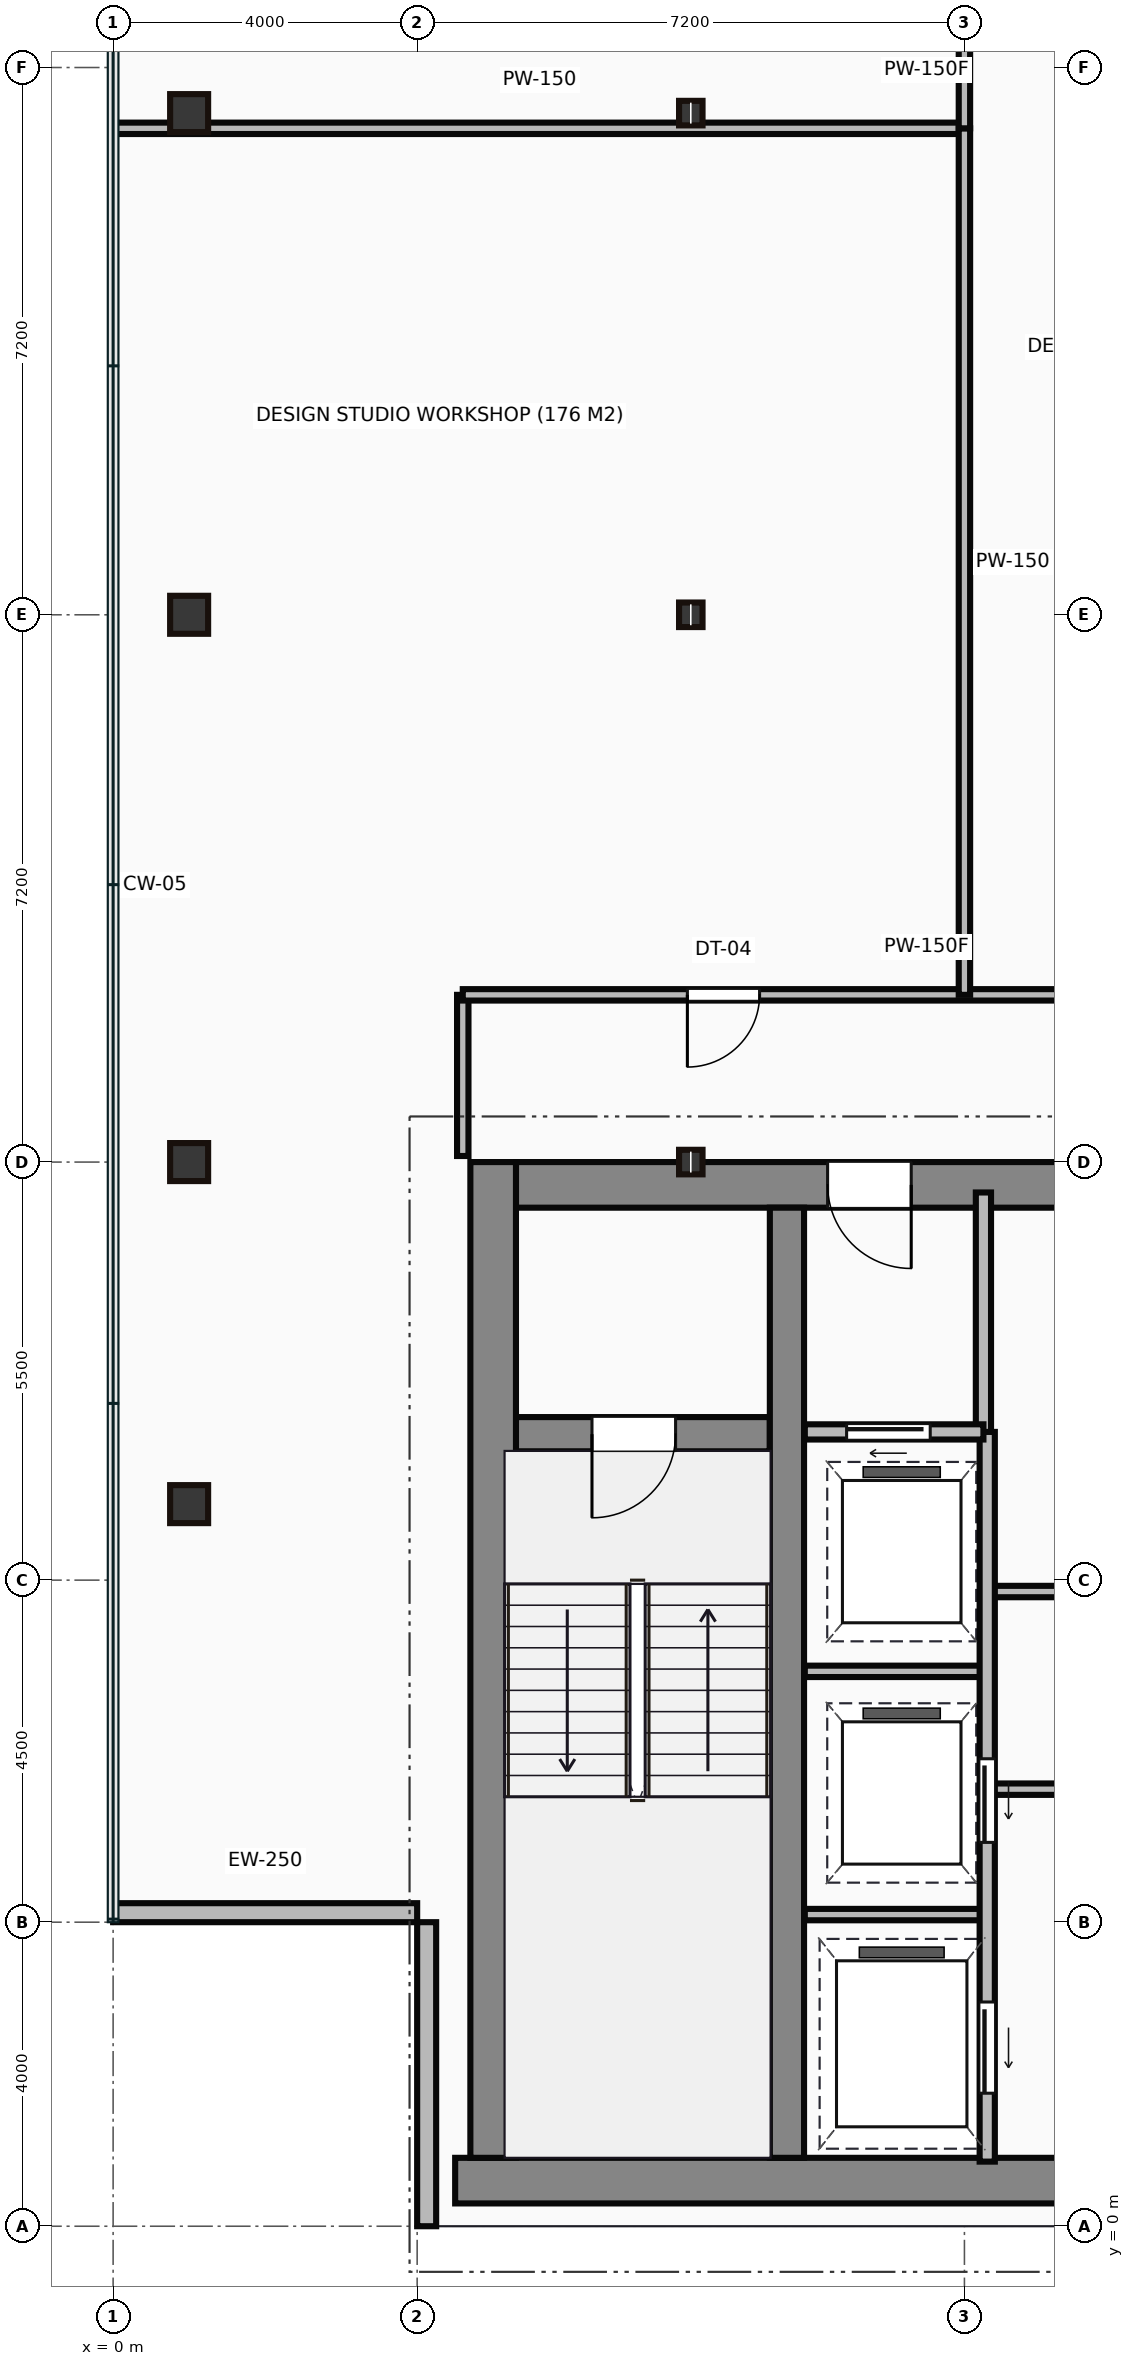
"""IFC4 building model, lengths in metres.
Left out: names, types, materials, properties, quantities, classifications, styles, units other than length and angle.
Written with IfcOpenShell. Run it as: python <this file> out.ifc"""

import sys

from ifc_helpers import new_model, si_unit, direction, frame, frame_2d, origin, origin_2d, place, context, subcontext, project, spatial, rectangle, hollow_rectangle, i_section, extrude, source, transform, mapped, element, fill, save


model = new_model("IFC4")
c1 = context("Model", 3, precision=1e-05, world=origin(), true_north=direction((0.0, 1.0)))
c2 = subcontext(c1, "Body", "Model", "MODEL_VIEW")
j1 = project(units=[si_unit("LENGTHUNIT", "METRE"), si_unit("PLANEANGLEUNIT", "RADIAN")], contexts=[c1])
p1 = place(None, origin())
s1 = spatial("IfcSite", under=j1, at=p1, CompositionType="ELEMENT")
p2 = place(p1, origin())
s2 = spatial("IfcBuilding", under=s1, at=p2, CompositionType="ELEMENT")
p3 = place(p2, frame((0.0, 0.0, 214.15)))
s3 = spatial("IfcBuildingStorey", under=s2, at=p3, CompositionType="ELEMENT", Elevation=214.15)
m1 = source(origin(), c2, "Body", "SweptSolid", [
    extrude(rectangle(XDim=29.5, YDim=0.6, at=frame_2d((14.75, 0.0))), origin(), (0.0, 0.0, 1.0), 3.65),
])
p4 = place(p3, frame((4.5, 0.6, 0.0), z_axis=(0.0, 0.0, 1.0), x_axis=(1.0, 0.0, 0.0)))
e1 = element("IfcWall", 1, at=p4, inside=s3, PredefinedType="SHEAR", context=c2, shape_type="MappedRepresentation", body=[
    mapped(m1, transform((0.0, 0.0, 0.0))),
])
m2 = source(origin(), c2, "Body", "SweptSolid", [
    extrude(rectangle(XDim=13.1, YDim=0.6, at=frame_2d((6.55, 0.0))), origin(), (0.0, 0.0, 1.0), 3.65),
])
p5 = place(p3, frame((5.0, 0.9, 0.0), z_axis=(0.0, 0.0, 1.0), x_axis=(0.0, 1.0, 0.0)))
e2 = element("IfcWall", 2, at=p5, inside=s3, PredefinedType="SHEAR", context=c2, shape_type="MappedRepresentation", body=[
    mapped(m2, transform((0.0, 0.0, 0.0))),
])
m3 = source(origin(), c2, "Body", "SweptSolid", [
    extrude(rectangle(XDim=9.1, YDim=0.6, at=frame_2d((4.55, 0.0))), origin(), (0.0, 0.0, 1.0), 3.65),
])
p6 = place(p3, frame((5.3, 13.7, 0.0), z_axis=(0.0, 0.0, 1.0), x_axis=(1.0, 0.0, 0.0)))
e3 = element("IfcWall", 3, at=p6, inside=s3, PredefinedType="SHEAR", context=c2, shape_type="MappedRepresentation", body=[
    mapped(m3, transform((0.0, 0.0, 0.0))),
])
p7 = place(p6, frame((4.1, 0.0, 0.0)))
e4 = element("IfcOpeningElement", 4, at=p7, cuts=e3, PredefinedType="OPENING", context=c2, shape_type="SweptSolid", body=[
    extrude(rectangle(XDim=1.1, YDim=2.15, at=frame_2d((0.55, 1.075))), frame((0.0, 0.31, 0.0), z_axis=(0.0, -1.0, 0.0), x_axis=(1.0, 0.0, 0.0)), (0.0, 0.0, 1.0), 0.62),
])
m4 = source(origin(), c2, "Body", "SweptSolid", [
    extrude(rectangle(XDim=12.5, YDim=0.45, at=frame_2d((6.25, 0.0))), origin(), (0.0, 0.0, 1.0), 3.65),
])
p8 = place(p3, frame((8.865, 0.9, 0.0), z_axis=(0.0, 0.0, 1.0), x_axis=(0.0, 1.0, 0.0)))
e5 = element("IfcWall", 5, at=p8, inside=s3, PredefinedType="SHEAR", context=c2, shape_type="MappedRepresentation", body=[
    mapped(m4, transform((0.0, 0.0, 0.0))),
])
m5 = source(origin(), c2, "Body", "SweptSolid", [
    extrude(rectangle(XDim=3.39, YDim=0.45, at=frame_2d((1.695, 0.0))), origin(), (0.0, 0.0, 1.0), 3.65),
])
p9 = place(p3, frame((5.25, 10.42, 0.0), z_axis=(0.0, 0.0, 1.0), x_axis=(1.0, 0.0, 0.0)))
e6 = element("IfcWall", 6, at=p9, inside=s3, PredefinedType="SHEAR", context=c2, shape_type="MappedRepresentation", body=[
    mapped(m5, transform((0.0, 0.0, 0.0))),
])
p10 = place(p9, frame((1.05, 0.0, 0.0)))
e7 = element("IfcOpeningElement", 7, at=p10, cuts=e6, PredefinedType="OPENING", context=c2, shape_type="SweptSolid", body=[
    extrude(rectangle(XDim=1.1, YDim=2.15, at=frame_2d((0.55, 1.075))), frame((0.0, 0.235, 0.0), z_axis=(0.0, -1.0, 0.0), x_axis=(1.0, 0.0, 0.0)), (0.0, 0.0, 1.0), 0.47),
])
m6 = source(origin(), c2, "Body", "SweptSolid", [
    extrude(hollow_rectangle(XDim=0.5, YDim=0.5, WallThickness=0.022, at=origin_2d()), origin(), (0.0, 0.0, 1.0), 3.65),
])
for number, where, z_axis, x_axis in (
    (8, (1.0, 9.5, 0.0), (0.0, 0.0, 1.0), (1.0, 0.0, 0.0)),
    (9, (1.0, 14.0, 0.0), (0.0, 0.0, 1.0), (1.0, 0.0, 0.0)),
    (10, (1.0, 21.2, 0.0), (0.0, 0.0, 1.0), (1.0, 0.0, 0.0)),
    (11, (1.0, 27.8, 0.0), (0.0, 0.0, 1.0), (1.0, 0.0, 0.0)),
):
    element("IfcColumn", number, at=place(p3, frame(where, z_axis=z_axis, x_axis=x_axis)), inside=s3, PredefinedType="COLUMN", context=c2, shape_type="MappedRepresentation", body=[
        mapped(m6, transform((0.0, 0.0, 0.0))),
    ])
m7 = source(origin(), c2, "Body", "SweptSolid", [
    extrude(i_section(OverallWidth=0.309, OverallDepth=0.323, WebThickness=0.014, FlangeThickness=0.023, at=origin_2d()), origin(), (0.0, 0.0, 1.0), 3.65),
])
for number, where, z_axis, x_axis in (
    (12, (7.6, 14.0, 0.0), (0.0, 0.0, 1.0), (1.0, 0.0, 0.0)),
    (13, (7.6, 21.2, 0.0), (0.0, 0.0, 1.0), (1.0, 0.0, 0.0)),
    (14, (7.6, 27.8, 0.0), (0.0, 0.0, 1.0), (1.0, 0.0, 0.0)),
):
    element("IfcColumn", number, at=place(p3, frame(where, z_axis=z_axis, x_axis=x_axis)), inside=s3, PredefinedType="COLUMN", context=c2, shape_type="MappedRepresentation", body=[
        mapped(m7, transform((0.0, 0.0, 0.0))),
    ])
m8 = source(origin(), c2, "Body", "SweptSolid", [
    extrude(rectangle(XDim=4.0, YDim=0.25, at=frame_2d((2.0, 0.0))), origin(), (0.0, 0.0, 1.0), 3.4),
])
for number, where, z_axis, x_axis in (
    (15, (0.0, 4.125, 0.0), (0.0, 0.0, 1.0), (1.0, 0.0, 0.0)),
    (16, (4.125, 4.0, 0.0), (0.0, 0.0, 1.0), (0.0, -1.0, 0.0)),
):
    element("IfcWall", number, at=place(p3, frame(where, z_axis=z_axis, x_axis=x_axis)), inside=s3, PredefinedType="STANDARD", context=c2, shape_type="MappedRepresentation", body=[
        mapped(m8, transform((0.0, 0.0, 0.0))),
    ])
m9 = source(origin(), c2, "Body", "SweptSolid", [
    extrude(rectangle(XDim=3.18, YDim=0.2, at=frame_2d((1.59, 0.0))), origin(), (0.0, 0.0, 1.0), 3.4),
])
p11 = place(p3, frame((11.45, 10.42, 0.0), z_axis=(0.0, 0.0, 1.0), x_axis=(0.0, 1.0, 0.0)))
e17 = element("IfcWall", 17, at=p11, inside=s3, PredefinedType="PARTITIONING", context=c2, shape_type="MappedRepresentation", body=[
    mapped(m9, transform((0.0, 0.0, 0.0))),
])
m10 = source(origin(), c2, "Body", "SweptSolid", [
    extrude(rectangle(XDim=2.35, YDim=0.2, at=frame_2d((1.175, 0.0))), origin(), (0.0, 0.0, 1.0), 3.4),
])
p12 = place(p3, frame((9.1, 10.45, 0.0), z_axis=(0.0, 0.0, 1.0), x_axis=(1.0, 0.0, 0.0)))
e18 = element("IfcWall", 18, at=p12, inside=s3, PredefinedType="PARTITIONING", context=c2, shape_type="MappedRepresentation", body=[
    mapped(m10, transform((0.0, 0.0, 0.0))),
])
p13 = place(p12, frame((0.55, 0.0, 0.0)))
e19 = element("IfcOpeningElement", 19, at=p13, cuts=e18, PredefinedType="OPENING", context=c2, shape_type="SweptSolid", body=[
    extrude(rectangle(XDim=1.1, YDim=2.15, at=frame_2d((0.55, 1.075))), frame((0.0, 0.11, 0.0), z_axis=(0.0, -1.0, 0.0), x_axis=(1.0, 0.0, 0.0)), (0.0, 0.0, 1.0), 0.22),
])
m11 = source(origin(), c2, "Body", "SweptSolid", [
    extrude(rectangle(XDim=9.6, YDim=0.2, at=frame_2d((4.8, 0.0))), origin(), (0.0, 0.0, 1.0), 3.4),
])
p14 = place(p3, frame((11.5, 0.85, 0.0), z_axis=(0.0, 0.0, 1.0), x_axis=(0.0, 1.0, 0.0)))
e20 = element("IfcWall", 20, at=p14, inside=s3, PredefinedType="PARTITIONING", context=c2, shape_type="MappedRepresentation", body=[
    mapped(m11, transform((0.0, 0.0, 0.0))),
])
p15 = place(p14, frame((4.2, 0.0, 0.0)))
e21 = element("IfcOpeningElement", 21, at=p15, cuts=e20, PredefinedType="OPENING", context=c2, shape_type="SweptSolid", body=[
    extrude(rectangle(XDim=1.1, YDim=2.15, at=frame_2d((0.55, 1.075))), frame((0.0, 0.11, 0.0), z_axis=(0.0, -1.0, 0.0), x_axis=(1.0, 0.0, 0.0)), (0.0, 0.0, 1.0), 0.22),
])
p16 = place(p14, frame((0.9, 0.0, 0.0)))
e22 = element("IfcOpeningElement", 22, at=p16, cuts=e20, PredefinedType="OPENING", context=c2, shape_type="SweptSolid", body=[
    extrude(rectangle(XDim=1.2, YDim=2.15, at=frame_2d((0.6, 1.075))), frame((0.0, 0.11, 0.0), z_axis=(0.0, -1.0, 0.0), x_axis=(1.0, 0.0, 0.0)), (0.0, 0.0, 1.0), 0.22),
])
m12 = source(origin(), c2, "Body", "SweptSolid", [
    extrude(rectangle(XDim=2.4, YDim=0.15, at=frame_2d((1.2, 0.0))), origin(), (0.0, 0.0, 1.0), 3.4),
])
for number, where, z_axis, x_axis in (
    (23, (9.1, 4.1, 0.0), (0.0, 0.0, 1.0), (1.0, 0.0, 0.0)),
    (24, (9.1, 7.3, 0.0), (0.0, 0.0, 1.0), (1.0, 0.0, 0.0)),
):
    element("IfcWall", number, at=place(p3, frame(where, z_axis=z_axis, x_axis=x_axis)), inside=s3, PredefinedType="PARTITIONING", context=c2, shape_type="MappedRepresentation", body=[
        mapped(m12, transform((0.0, 0.0, 0.0))),
    ])
m13 = source(origin(), c2, "Body", "SweptSolid", [
    extrude(rectangle(XDim=11.85, YDim=0.15, at=frame_2d((5.925, 0.0))), origin(), (0.0, 0.0, 1.0), 3.4),
])
p17 = place(p3, frame((11.55, 5.75, 0.0), z_axis=(0.0, 0.0, 1.0), x_axis=(1.0, 0.0, 0.0)))
e25 = element("IfcWall", 25, at=p17, inside=s3, PredefinedType="PARTITIONING", context=c2, shape_type="MappedRepresentation", body=[
    mapped(m13, transform((0.0, 0.0, 0.0))),
])
p18 = place(p3, frame((11.55, 8.35, 0.0), z_axis=(0.0, 0.0, 1.0), x_axis=(1.0, 0.0, 0.0)))
e26 = element("IfcWall", 26, at=p18, inside=s3, PredefinedType="PARTITIONING", context=c2, shape_type="MappedRepresentation", body=[
    mapped(m13, transform((0.0, 0.0, 0.0))),
])
p19 = place(p18, frame((1.1, 0.0, 0.0)))
e27 = element("IfcOpeningElement", 27, at=p19, cuts=e26, PredefinedType="OPENING", context=c2, shape_type="SweptSolid", body=[
    extrude(rectangle(XDim=0.95, YDim=2.15, at=frame_2d((0.475, 1.075))), frame((0.0, 0.085, 0.0), z_axis=(0.0, -1.0, 0.0), x_axis=(1.0, 0.0, 0.0)), (0.0, 0.0, 1.0), 0.17),
])
p20 = place(p18, frame((9.4, 0.0, 0.0)))
e28 = element("IfcOpeningElement", 28, at=p20, cuts=e26, PredefinedType="OPENING", context=c2, shape_type="SweptSolid", body=[
    extrude(rectangle(XDim=0.95, YDim=2.15, at=frame_2d((0.475, 1.075))), frame((0.0, 0.085, 0.0), z_axis=(0.0, -1.0, 0.0), x_axis=(1.0, 0.0, 0.0)), (0.0, 0.0, 1.0), 0.17),
])
m14 = source(origin(), c2, "Body", "SweptSolid", [
    extrude(rectangle(XDim=2.12, YDim=0.15, at=frame_2d((1.06, 0.0))), origin(), (0.0, 0.0, 1.0), 3.4),
])
p21 = place(p3, frame((4.6, 14.08, 0.0), z_axis=(0.0, 0.0, 1.0), x_axis=(0.0, 1.0, 0.0)))
e29 = element("IfcWall", 29, at=p21, inside=s3, PredefinedType="PARTITIONING", context=c2, shape_type="MappedRepresentation", body=[
    mapped(m14, transform((0.0, 0.0, 0.0))),
])
m15 = source(origin(), c2, "Body", "SweptSolid", [
    extrude(rectangle(XDim=12.2, YDim=0.15, at=frame_2d((6.1, 0.0))), origin(), (0.0, 0.0, 1.0), 3.4),
])
p22 = place(p3, frame((4.6, 16.2, 0.0), z_axis=(0.0, 0.0, 1.0), x_axis=(1.0, 0.0, 0.0)))
e30 = element("IfcWall", 30, at=p22, inside=s3, PredefinedType="PARTITIONING", context=c2, shape_type="MappedRepresentation", body=[
    mapped(m15, transform((0.0, 0.0, 0.0))),
])
p23 = place(p22, frame((2.955, 0.0, 0.0)))
e31 = element("IfcOpeningElement", 31, at=p23, cuts=e30, PredefinedType="OPENING", context=c2, shape_type="SweptSolid", body=[
    extrude(rectangle(XDim=0.95, YDim=2.15, at=frame_2d((0.475, 1.075))), frame((0.0, 0.085, 0.0), z_axis=(0.0, -1.0, 0.0), x_axis=(1.0, 0.0, 0.0)), (0.0, 0.0, 1.0), 0.17),
])
m16 = source(origin(), c2, "Body", "SweptSolid", [
    extrude(rectangle(XDim=11.18, YDim=0.15, at=frame_2d((5.59, 0.0))), origin(), (0.0, 0.0, 1.0), 3.4),
])
p24 = place(p3, frame((0.02, 27.6, 0.0), z_axis=(0.0, 0.0, 1.0), x_axis=(1.0, 0.0, 0.0)))
e32 = element("IfcWall", 32, at=p24, inside=s3, PredefinedType="PARTITIONING", context=c2, shape_type="MappedRepresentation", body=[
    mapped(m16, transform((0.0, 0.0, 0.0))),
])
m17 = source(origin(), c2, "Body", "SweptSolid", [
    extrude(rectangle(XDim=11.4, YDim=0.15, at=frame_2d((5.7, 0.0))), origin(), (0.0, 0.0, 1.0), 3.4),
])
p25 = place(p3, frame((11.2, 27.6, 0.0), z_axis=(0.0, 0.0, 1.0), x_axis=(0.0, -1.0, 0.0)))
e33 = element("IfcWall", 33, at=p25, inside=s3, PredefinedType="PARTITIONING", context=c2, shape_type="MappedRepresentation", body=[
    mapped(m17, transform((0.0, 0.0, 0.0))),
])
m18 = source(origin(), c2, "Body", "SweptSolid", [
    extrude(rectangle(XDim=1.4, YDim=0.15, at=frame_2d((0.7, 0.0))), origin(), (0.0, 0.0, 1.0), 3.4),
])
p26 = place(p3, frame((11.2, 29.0, 0.0), z_axis=(0.0, 0.0, 1.0), x_axis=(0.0, -1.0, 0.0)))
e34 = element("IfcWall", 34, at=p26, inside=s3, PredefinedType="PARTITIONING", context=c2, shape_type="MappedRepresentation", body=[
    mapped(m18, transform((0.0, 0.0, 0.0))),
])
m19 = source(origin(), c2, "Body", "SweptSolid", [
    extrude(rectangle(XDim=1.1, YDim=2.15, at=frame_2d((0.55, 1.075))), frame((0.0, 0.025, 0.0), z_axis=(0.0, -1.0, 0.0), x_axis=(1.0, 0.0, 0.0)), (0.0, 0.0, 1.0), 0.05),
])
p27 = place(p10, frame((1.1, 0.0, 0.0), z_axis=(0.0, 0.0, 1.0), x_axis=(-1.0, 0.0, 0.0)))
e35 = element("IfcDoor", 35, at=p27, inside=s3, OperationType="SINGLE_SWING_LEFT", PredefinedType="DOOR", context=c2, shape_type="MappedRepresentation", body=[
    mapped(m19, transform((0.0, 0.0, 0.0))),
])
fill(e7, e35)
p28 = place(p7, origin())
e36 = element("IfcDoor", 36, at=p28, inside=s3, OperationType="SINGLE_SWING_RIGHT", PredefinedType="DOOR", context=c2, shape_type="MappedRepresentation", body=[
    mapped(m19, transform((0.0, 0.0, 0.0))),
])
fill(e4, e36)
p29 = place(p13, origin())
e37 = element("IfcDoor", 37, at=p29, inside=s3, OperationType="SLIDING_TO_LEFT", PredefinedType="DOOR", context=c2, shape_type="MappedRepresentation", body=[
    mapped(m19, transform((0.0, 0.0, 0.0))),
])
fill(e19, e37)
p30 = place(p15, frame((1.1, 0.0, 0.0), z_axis=(0.0, 0.0, 1.0), x_axis=(-1.0, 0.0, 0.0)))
e38 = element("IfcDoor", 38, at=p30, inside=s3, OperationType="SLIDING_TO_LEFT", PredefinedType="DOOR", context=c2, shape_type="MappedRepresentation", body=[
    mapped(m19, transform((0.0, 0.0, 0.0))),
])
fill(e21, e38)
m20 = source(origin(), c2, "Body", "SweptSolid", [
    extrude(rectangle(XDim=1.2, YDim=2.15, at=frame_2d((0.6, 1.075))), frame((0.0, 0.025, 0.0), z_axis=(0.0, -1.0, 0.0), x_axis=(1.0, 0.0, 0.0)), (0.0, 0.0, 1.0), 0.05),
])
p31 = place(p16, frame((1.2, 0.0, 0.0), z_axis=(0.0, 0.0, 1.0), x_axis=(-1.0, 0.0, 0.0)))
e39 = element("IfcDoor", 39, at=p31, inside=s3, OperationType="SLIDING_TO_LEFT", PredefinedType="DOOR", context=c2, shape_type="MappedRepresentation", body=[
    mapped(m20, transform((0.0, 0.0, 0.0))),
])
fill(e22, e39)
m21 = source(origin(), c2, "Body", "SweptSolid", [
    extrude(rectangle(XDim=0.95, YDim=2.15, at=frame_2d((0.475, 1.075))), frame((0.0, 0.025, 0.0), z_axis=(0.0, -1.0, 0.0), x_axis=(1.0, 0.0, 0.0)), (0.0, 0.0, 1.0), 0.05),
])
p32 = place(p23, origin())
e40 = element("IfcDoor", 40, at=p32, inside=s3, OperationType="SINGLE_SWING_LEFT", PredefinedType="DOOR", context=c2, shape_type="MappedRepresentation", body=[
    mapped(m21, transform((0.0, 0.0, 0.0))),
])
fill(e31, e40)
save(model, sys.argv[1])
